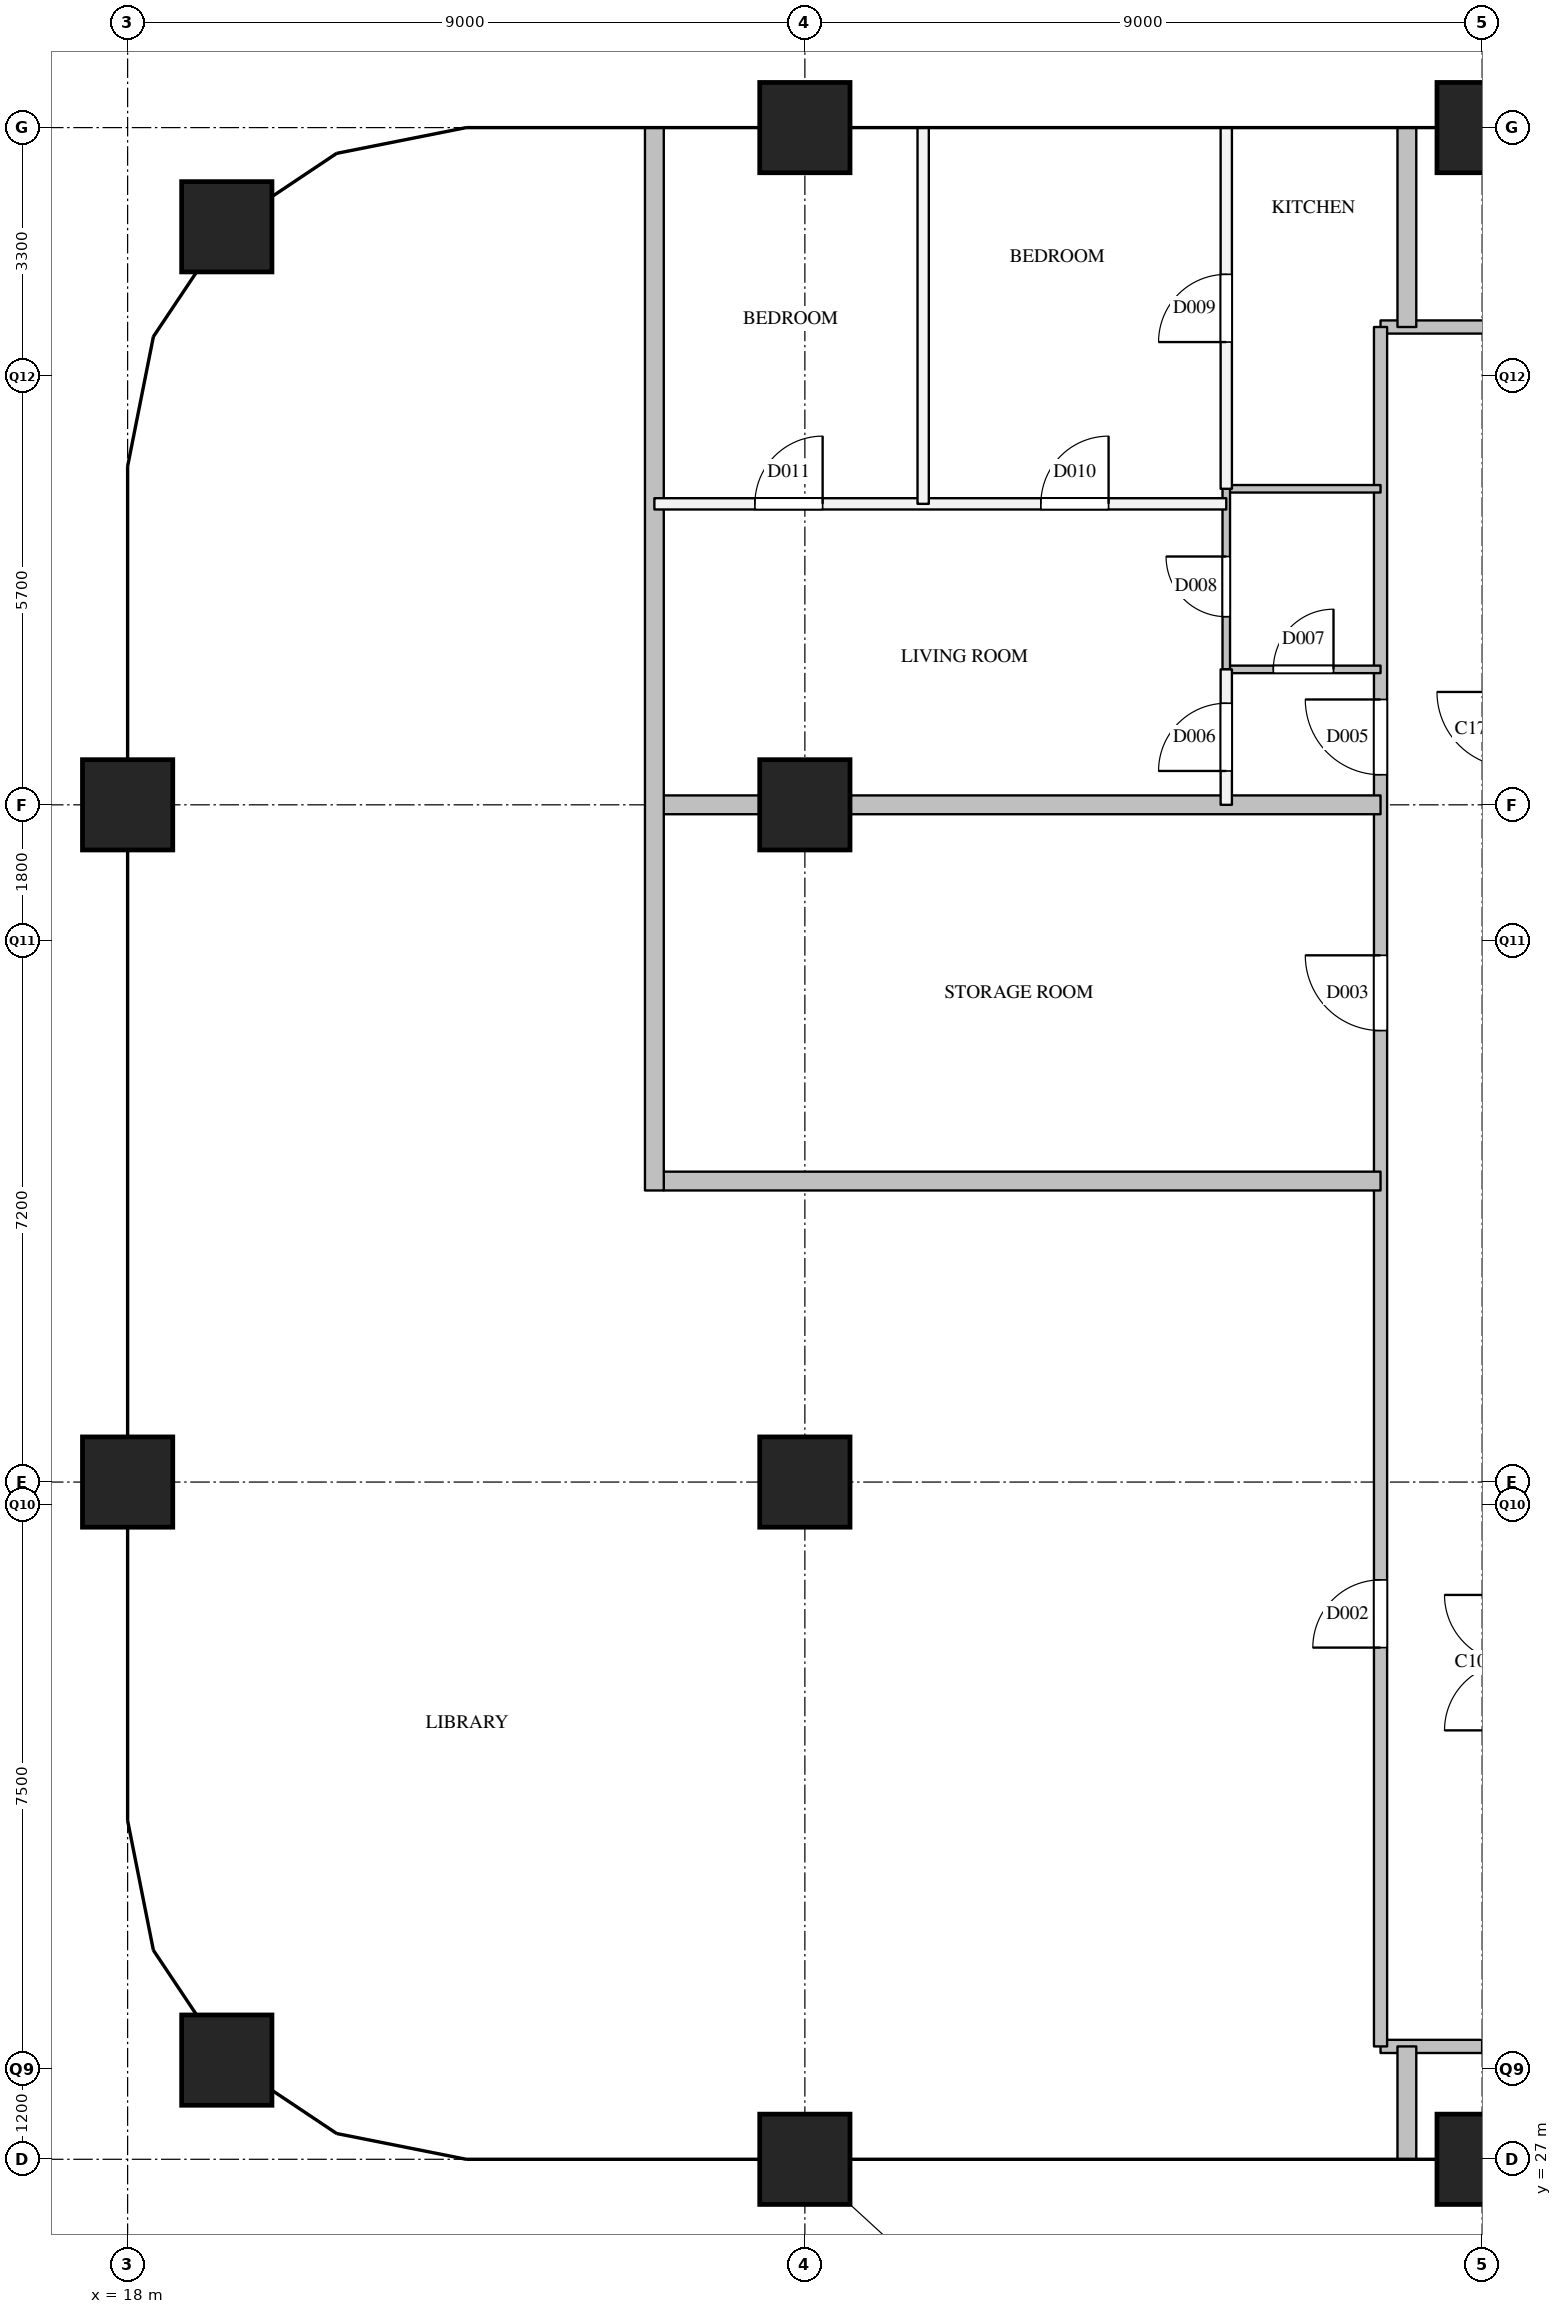
"""IFC4 building model, lengths in metres.
Left out: names, types, materials, properties, quantities, classifications, styles, units other than length and angle.
Written with IfcOpenShell. Run it as: python <this file> out.ifc"""

import sys

from ifc_helpers import new_model, si_unit, direction, frame, frame_2d, origin, origin_2d, place, context, subcontext, project, spatial, rectangle, extrude, element, fill, save


model = new_model("IFC4")
c1 = context("Model", 3, precision=1e-05, world=origin(), true_north=direction((0.0, 1.0)))
c2 = subcontext(c1, "Body", "Model", "MODEL_VIEW")
j1 = project(units=[si_unit("LENGTHUNIT", "METRE"), si_unit("PLANEANGLEUNIT", "RADIAN")], contexts=[c1])
p1 = place(None, origin())
s1 = spatial("IfcSite", under=j1, at=p1, CompositionType="ELEMENT")
p2 = place(p1, origin())
s2 = spatial("IfcBuilding", under=s1, at=p2, CompositionType="ELEMENT")
p3 = place(p2, frame((0.0, 0.0, 257.9)))
s3 = spatial("IfcBuildingStorey", under=s2, at=p3, CompositionType="ELEMENT", Elevation=257.9)
for number, where, z_axis, x_axis in (
    (1, (19.318, 28.318, 0.0), (0.0, 0.0, 1.0), (1.0, 0.0, 0.0)),
    (2, (18.0, 36.0, 0.0), (0.0, 0.0, 1.0), (1.0, 0.0, 0.0)),
    (3, (18.0, 45.0, 0.0), (0.0, 0.0, 1.0), (1.0, 0.0, 0.0)),
    (4, (19.318, 52.682, 0.0), (0.0, 0.0, 1.0), (1.0, 0.0, 0.0)),
    (5, (27.0, 27.0, 0.0), (0.0, 0.0, 1.0), (1.0, 0.0, 0.0)),
    (6, (27.0, 36.0, 0.0), (0.0, 0.0, 1.0), (1.0, 0.0, 0.0)),
    (7, (27.0, 45.0, 0.0), (0.0, 0.0, 1.0), (1.0, 0.0, 0.0)),
    (8, (27.0, 54.0, 0.0), (0.0, 0.0, 1.0), (1.0, 0.0, 0.0)),
    (9, (36.0, 27.0, 0.0), (0.0, 0.0, 1.0), (1.0, 0.0, 0.0)),
    (10, (36.0, 54.0, 0.0), (0.0, 0.0, 1.0), (1.0, 0.0, 0.0)),
):
    element("IfcColumn", number, at=place(p3, frame(where, z_axis=z_axis, x_axis=x_axis)), inside=s3, PredefinedType="COLUMN", context=c2, shape_type="SweptSolid", body=[
        extrude(rectangle(XDim=1.2, YDim=1.2, at=origin_2d()), origin(), (0.0, 0.0, 1.0), 3.9),
    ])
p4 = place(p3, frame((34.65, 28.5, 0.0), z_axis=(0.0, 0.0, 1.0), x_axis=(1.0, 0.0, 0.0)))
e11 = element("IfcWall", 11, at=p4, inside=s3, PredefinedType="PARTITIONING", context=c2, shape_type="SweptSolid", body=[
    extrude(rectangle(XDim=1.35, YDim=0.175, at=frame_2d((0.675, 0.0))), origin(), (0.0, 0.0, 1.0), 3.6),
])
p5 = place(p3, frame((34.65, 51.35, 0.0), z_axis=(0.0, 0.0, 1.0), x_axis=(1.0, 0.0, 0.0)))
e12 = element("IfcWall", 12, at=p5, inside=s3, PredefinedType="PARTITIONING", context=c2, shape_type="SweptSolid", body=[
    extrude(rectangle(XDim=15.1, YDim=0.175, at=frame_2d((7.55, 0.0))), origin(), (0.0, 0.0, 1.0), 3.6),
])
p6 = place(p5, frame((2.4, 0.0, 0.0)))
e13 = element("IfcOpeningElement", 13, at=p6, cuts=e12, PredefinedType="OPENING", context=c2, shape_type="SweptSolid", body=[
    extrude(rectangle(XDim=0.9, YDim=2.1, at=frame_2d((0.45, 1.05))), frame((0.0, 0.097, 0.0), z_axis=(0.0, -1.0, 0.0), x_axis=(1.0, 0.0, 0.0)), (0.0, 0.0, 1.0), 0.195),
])
p7 = place(p5, frame((7.35, 0.0, 0.0)))
e14 = element("IfcOpeningElement", 14, at=p7, cuts=e12, PredefinedType="OPENING", context=c2, shape_type="SweptSolid", body=[
    extrude(rectangle(XDim=1.0, YDim=2.1, at=frame_2d((0.5, 1.05))), frame((0.0, 0.097, 0.0), z_axis=(0.0, -1.0, 0.0), x_axis=(1.0, 0.0, 0.0)), (0.0, 0.0, 1.0), 0.195),
])
p8 = place(p3, frame((34.65, 28.5, 0.0), z_axis=(0.0, 0.0, 1.0), x_axis=(0.0, 1.0, 0.0)))
e15 = element("IfcWall", 15, at=p8, inside=s3, PredefinedType="PARTITIONING", context=c2, shape_type="SweptSolid", body=[
    extrude(rectangle(XDim=22.85, YDim=0.175, at=frame_2d((11.425, 0.0))), origin(), (0.0, 0.0, 1.0), 3.6),
])
p9 = place(p8, frame((5.3, 0.0, 0.0)))
e16 = element("IfcOpeningElement", 16, at=p9, cuts=e15, PredefinedType="OPENING", context=c2, shape_type="SweptSolid", body=[
    extrude(rectangle(XDim=0.9, YDim=2.1, at=frame_2d((0.45, 1.05))), frame((0.0, 0.097, 0.0), z_axis=(0.0, -1.0, 0.0), x_axis=(1.0, 0.0, 0.0)), (0.0, 0.0, 1.0), 0.195),
])
p10 = place(p8, frame((13.5, 0.0, 0.0)))
e17 = element("IfcOpeningElement", 17, at=p10, cuts=e15, PredefinedType="OPENING", context=c2, shape_type="SweptSolid", body=[
    extrude(rectangle(XDim=1.0, YDim=2.1, at=frame_2d((0.5, 1.05))), frame((0.0, 0.097, 0.0), z_axis=(0.0, -1.0, 0.0), x_axis=(1.0, 0.0, 0.0)), (0.0, 0.0, 1.0), 0.195),
])
p11 = place(p8, frame((16.9, 0.0, 0.0)))
e18 = element("IfcOpeningElement", 18, at=p11, cuts=e15, PredefinedType="OPENING", context=c2, shape_type="SweptSolid", body=[
    extrude(rectangle(XDim=1.0, YDim=2.1, at=frame_2d((0.5, 1.05))), frame((0.0, 0.097, 0.0), z_axis=(0.0, -1.0, 0.0), x_axis=(1.0, 0.0, 0.0)), (0.0, 0.0, 1.0), 0.195),
])
p12 = place(p3, frame((25.0, 49.0, 0.0), z_axis=(0.0, 0.0, 1.0), x_axis=(1.0, 0.0, 0.0)))
e19 = element("IfcWall", 19, at=p12, inside=s3, PredefinedType="PARTITIONING", context=c2, shape_type="SweptSolid", body=[
    extrude(rectangle(XDim=7.6, YDim=0.15, at=frame_2d((3.8, 0.0))), origin(), (0.0, 0.0, 1.0), 2.6),
])
p13 = place(p12, frame((5.136, 0.0, 0.0)))
e20 = element("IfcOpeningElement", 20, at=p13, cuts=e19, PredefinedType="OPENING", context=c2, shape_type="SweptSolid", body=[
    extrude(rectangle(XDim=0.9, YDim=2.1, at=frame_2d((0.45, 1.05))), frame((0.0, 0.085, 0.0), z_axis=(0.0, -1.0, 0.0), x_axis=(1.0, 0.0, 0.0)), (0.0, 0.0, 1.0), 0.17),
])
p14 = place(p12, frame((1.336, 0.0, 0.0)))
e21 = element("IfcOpeningElement", 21, at=p14, cuts=e19, PredefinedType="OPENING", context=c2, shape_type="SweptSolid", body=[
    extrude(rectangle(XDim=0.9, YDim=2.1, at=frame_2d((0.45, 1.05))), frame((0.0, 0.085, 0.0), z_axis=(0.0, -1.0, 0.0), x_axis=(1.0, 0.0, 0.0)), (0.0, 0.0, 1.0), 0.17),
])
p15 = place(p3, frame((28.572, 49.0, 0.0), z_axis=(0.0, 0.0, 1.0), x_axis=(0.0, 1.0, 0.0)))
e22 = element("IfcWall", 22, at=p15, inside=s3, PredefinedType="PARTITIONING", context=c2, shape_type="SweptSolid", body=[
    extrude(rectangle(XDim=5.0, YDim=0.15, at=frame_2d((2.5, 0.0))), origin(), (0.0, 0.0, 1.0), 2.6),
])
p16 = place(p3, frame((32.6, 45.0, 0.0), z_axis=(0.0, 0.0, 1.0), x_axis=(0.0, 1.0, 0.0)))
e23 = element("IfcWall", 23, at=p16, inside=s3, PredefinedType="PARTITIONING", context=c2, shape_type="SweptSolid", body=[
    extrude(rectangle(XDim=1.8, YDim=0.15, at=frame_2d((0.9, 0.0))), origin(), (0.0, 0.0, 1.0), 3.6),
])
p17 = place(p16, frame((0.45, 0.0, 0.0)))
e24 = element("IfcOpeningElement", 24, at=p17, cuts=e23, PredefinedType="OPENING", context=c2, shape_type="SweptSolid", body=[
    extrude(rectangle(XDim=0.9, YDim=2.1, at=frame_2d((0.45, 1.05))), frame((0.0, 0.085, 0.0), z_axis=(0.0, -1.0, 0.0), x_axis=(1.0, 0.0, 0.0)), (0.0, 0.0, 1.0), 0.17),
])
p18 = place(p3, frame((32.6, 49.2, 0.0), z_axis=(0.0, 0.0, 1.0), x_axis=(0.0, 1.0, 0.0)))
e25 = element("IfcWall", 25, at=p18, inside=s3, PredefinedType="PARTITIONING", context=c2, shape_type="SweptSolid", body=[
    extrude(rectangle(XDim=4.8, YDim=0.15, at=frame_2d((2.4, 0.0))), origin(), (0.0, 0.0, 1.0), 2.6),
])
p19 = place(p18, frame((1.95, 0.0, 0.0)))
e26 = element("IfcOpeningElement", 26, at=p19, cuts=e25, PredefinedType="OPENING", context=c2, shape_type="SweptSolid", body=[
    extrude(rectangle(XDim=0.9, YDim=2.1, at=frame_2d((0.45, 1.05))), frame((0.0, 0.085, 0.0), z_axis=(0.0, -1.0, 0.0), x_axis=(1.0, 0.0, 0.0)), (0.0, 0.0, 1.0), 0.17),
])
p20 = place(p3, frame((25.125, 40.0, 0.0), z_axis=(0.0, 0.0, 1.0), x_axis=(1.0, 0.0, 0.0)))
e27 = element("IfcWall", 27, at=p20, inside=s3, PredefinedType="PARTITIONING", context=c2, shape_type="SweptSolid", body=[
    extrude(rectangle(XDim=9.525, YDim=0.25, at=frame_2d((4.762, 0.0))), origin(), (0.0, 0.0, 1.0), 2.6),
])
p21 = place(p3, frame((25.0, 45.0, 0.0), z_axis=(0.0, 0.0, 1.0), x_axis=(1.0, 0.0, 0.0)))
e28 = element("IfcWall", 28, at=p21, inside=s3, PredefinedType="PARTITIONING", context=c2, shape_type="SweptSolid", body=[
    extrude(rectangle(XDim=9.65, YDim=0.25, at=frame_2d((4.825, 0.0))), origin(), (0.0, 0.0, 1.0), 3.6),
])
p22 = place(p3, frame((25.0, 39.875, 0.0), z_axis=(0.0, 0.0, 1.0), x_axis=(0.0, 1.0, 0.0)))
e29 = element("IfcWall", 29, at=p22, inside=s3, PredefinedType="PARTITIONING", context=c2, shape_type="SweptSolid", body=[
    extrude(rectangle(XDim=14.125, YDim=0.25, at=frame_2d((7.062, 0.0))), origin(), (0.0, 0.0, 1.0), 2.6),
])
p23 = place(p3, frame((35.0, 27.0, 0.0), z_axis=(0.0, 0.0, 1.0), x_axis=(0.0, 1.0, 0.0)))
e30 = element("IfcWall", 30, at=p23, inside=s3, PredefinedType="PARTITIONING", context=c2, shape_type="SweptSolid", body=[
    extrude(rectangle(XDim=1.5, YDim=0.25, at=frame_2d((0.75, 0.0))), origin(), (0.0, 0.0, 1.0), 2.6),
])
p24 = place(p3, frame((35.0, 51.35, 0.0), z_axis=(0.0, 0.0, 1.0), x_axis=(0.0, 1.0, 0.0)))
e31 = element("IfcWall", 31, at=p24, inside=s3, PredefinedType="PARTITIONING", context=c2, shape_type="SweptSolid", body=[
    extrude(rectangle(XDim=2.65, YDim=0.25, at=frame_2d((1.325, 0.0))), origin(), (0.0, 0.0, 1.0), 2.6),
])
p25 = place(p3, frame((32.6, 46.8, 0.0), z_axis=(0.0, 0.0, 1.0), x_axis=(1.0, 0.0, 0.0)))
e32 = element("IfcWall", 32, at=p25, inside=s3, PredefinedType="PARTITIONING", context=c2, shape_type="SweptSolid", body=[
    extrude(rectangle(XDim=2.05, YDim=0.1, at=frame_2d((1.025, 0.0))), origin(), (0.0, 0.0, 1.0), 3.6),
])
p26 = place(p25, frame((0.625, 0.0, 0.0)))
e33 = element("IfcOpeningElement", 33, at=p26, cuts=e32, PredefinedType="OPENING", context=c2, shape_type="SweptSolid", body=[
    extrude(rectangle(XDim=0.8, YDim=2.1, at=frame_2d((0.4, 1.05))), frame((0.0, 0.06, 0.0), z_axis=(0.0, -1.0, 0.0), x_axis=(1.0, 0.0, 0.0)), (0.0, 0.0, 1.0), 0.12),
])
p27 = place(p3, frame((32.6, 49.2, 0.0), z_axis=(0.0, 0.0, 1.0), x_axis=(1.0, 0.0, 0.0)))
e34 = element("IfcWall", 34, at=p27, inside=s3, PredefinedType="PARTITIONING", context=c2, shape_type="SweptSolid", body=[
    extrude(rectangle(XDim=2.05, YDim=0.1, at=frame_2d((1.025, 0.0))), origin(), (0.0, 0.0, 1.0), 3.6),
])
p28 = place(p3, frame((32.6, 46.8, 0.0), z_axis=(0.0, 0.0, 1.0), x_axis=(0.0, 1.0, 0.0)))
e35 = element("IfcWall", 35, at=p28, inside=s3, PredefinedType="PARTITIONING", context=c2, shape_type="SweptSolid", body=[
    extrude(rectangle(XDim=2.4, YDim=0.1, at=frame_2d((1.2, 0.0))), origin(), (0.0, 0.0, 1.0), 3.6),
])
p29 = place(p28, frame((0.7, 0.0, 0.0)))
e36 = element("IfcOpeningElement", 36, at=p29, cuts=e35, PredefinedType="OPENING", context=c2, shape_type="SweptSolid", body=[
    extrude(rectangle(XDim=0.8, YDim=2.1, at=frame_2d((0.4, 1.05))), frame((0.0, 0.06, 0.0), z_axis=(0.0, -1.0, 0.0), x_axis=(1.0, 0.0, 0.0)), (0.0, 0.0, 1.0), 0.12),
])
p30 = place(p9, origin())
e37 = element("IfcDoor", 37, at=p30, inside=s3, OperationType="SINGLE_SWING_LEFT", PredefinedType="DOOR", context=c2, shape_type="SweptSolid", body=[
    extrude(rectangle(XDim=0.9, YDim=2.1, at=frame_2d((0.45, 1.05))), frame((0.0, 0.025, 0.0), z_axis=(0.0, -1.0, 0.0), x_axis=(1.0, 0.0, 0.0)), (0.0, 0.0, 1.0), 0.05),
])
fill(e16, e37)
p31 = place(p10, origin())
e38 = element("IfcDoor", 38, at=p31, inside=s3, OperationType="SINGLE_SWING_RIGHT", PredefinedType="DOOR", context=c2, shape_type="SweptSolid", body=[
    extrude(rectangle(XDim=1.0, YDim=2.1, at=frame_2d((0.5, 1.05))), frame((0.0, 0.025, 0.0), z_axis=(0.0, -1.0, 0.0), x_axis=(1.0, 0.0, 0.0)), (0.0, 0.0, 1.0), 0.05),
])
fill(e17, e38)
p32 = place(p11, origin())
e39 = element("IfcDoor", 39, at=p32, inside=s3, OperationType="SINGLE_SWING_RIGHT", PredefinedType="DOOR", context=c2, shape_type="SweptSolid", body=[
    extrude(rectangle(XDim=1.0, YDim=2.1, at=frame_2d((0.5, 1.05))), frame((0.0, 0.025, 0.0), z_axis=(0.0, -1.0, 0.0), x_axis=(1.0, 0.0, 0.0)), (0.0, 0.0, 1.0), 0.05),
])
fill(e18, e39)
p33 = place(p17, origin())
e40 = element("IfcDoor", 40, at=p33, inside=s3, OperationType="SINGLE_SWING_LEFT", PredefinedType="DOOR", context=c2, shape_type="SweptSolid", body=[
    extrude(rectangle(XDim=0.9, YDim=2.1, at=frame_2d((0.45, 1.05))), frame((0.0, 0.025, 0.0), z_axis=(0.0, -1.0, 0.0), x_axis=(1.0, 0.0, 0.0)), (0.0, 0.0, 1.0), 0.05),
])
fill(e24, e40)
p34 = place(p26, origin())
e41 = element("IfcDoor", 41, at=p34, inside=s3, OperationType="SINGLE_SWING_RIGHT", PredefinedType="DOOR", context=c2, shape_type="SweptSolid", body=[
    extrude(rectangle(XDim=0.8, YDim=2.1, at=frame_2d((0.4, 1.05))), frame((0.0, 0.025, 0.0), z_axis=(0.0, -1.0, 0.0), x_axis=(1.0, 0.0, 0.0)), (0.0, 0.0, 1.0), 0.05),
])
fill(e33, e41)
p35 = place(p29, origin())
e42 = element("IfcDoor", 42, at=p35, inside=s3, OperationType="SINGLE_SWING_RIGHT", PredefinedType="DOOR", context=c2, shape_type="SweptSolid", body=[
    extrude(rectangle(XDim=0.8, YDim=2.1, at=frame_2d((0.4, 1.05))), frame((0.0, 0.025, 0.0), z_axis=(0.0, -1.0, 0.0), x_axis=(1.0, 0.0, 0.0)), (0.0, 0.0, 1.0), 0.05),
])
fill(e36, e42)
p36 = place(p19, origin())
e43 = element("IfcDoor", 43, at=p36, inside=s3, OperationType="SINGLE_SWING_LEFT", PredefinedType="DOOR", context=c2, shape_type="SweptSolid", body=[
    extrude(rectangle(XDim=0.9, YDim=2.1, at=frame_2d((0.45, 1.05))), frame((0.0, 0.025, 0.0), z_axis=(0.0, -1.0, 0.0), x_axis=(1.0, 0.0, 0.0)), (0.0, 0.0, 1.0), 0.05),
])
fill(e26, e43)
p37 = place(p13, origin())
e44 = element("IfcDoor", 44, at=p37, inside=s3, OperationType="SINGLE_SWING_RIGHT", PredefinedType="DOOR", context=c2, shape_type="SweptSolid", body=[
    extrude(rectangle(XDim=0.9, YDim=2.1, at=frame_2d((0.45, 1.05))), frame((0.0, 0.025, 0.0), z_axis=(0.0, -1.0, 0.0), x_axis=(1.0, 0.0, 0.0)), (0.0, 0.0, 1.0), 0.05),
])
fill(e20, e44)
p38 = place(p14, origin())
e45 = element("IfcDoor", 45, at=p38, inside=s3, OperationType="SINGLE_SWING_RIGHT", PredefinedType="DOOR", context=c2, shape_type="SweptSolid", body=[
    extrude(rectangle(XDim=0.9, YDim=2.1, at=frame_2d((0.45, 1.05))), frame((0.0, 0.025, 0.0), z_axis=(0.0, -1.0, 0.0), x_axis=(1.0, 0.0, 0.0)), (0.0, 0.0, 1.0), 0.05),
])
fill(e21, e45)
save(model, sys.argv[1])
